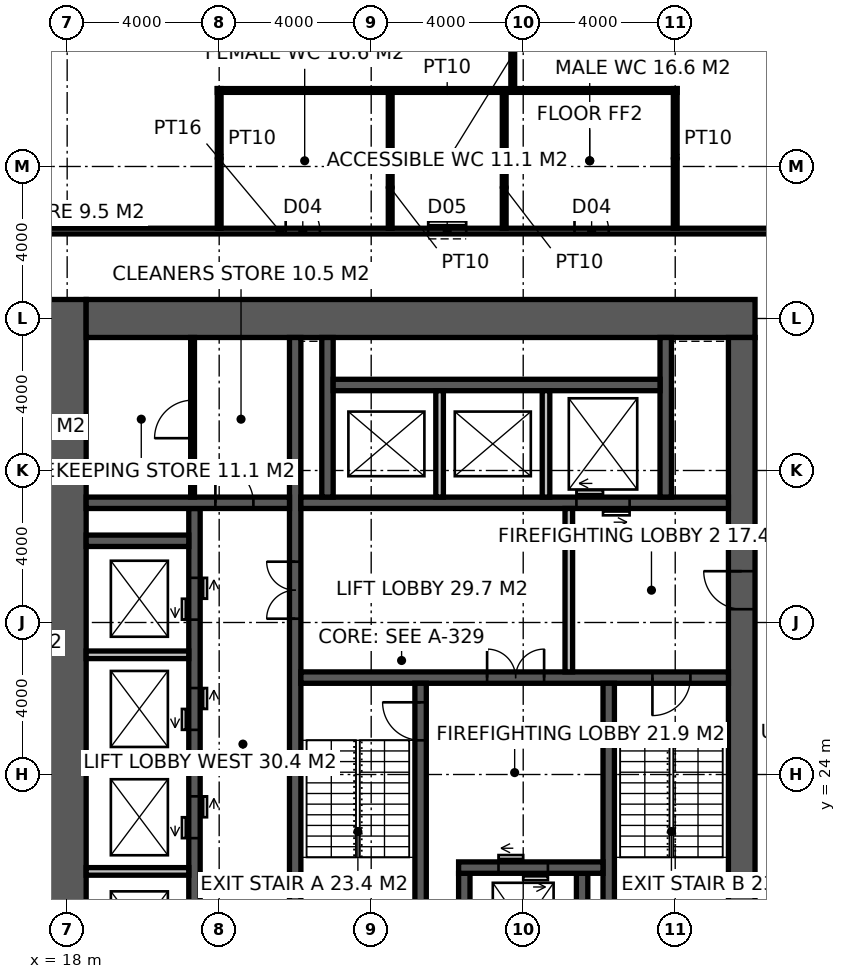
"""IFC4 building model, lengths in metres.
Left out: names, types, materials, properties, quantities, classifications, styles, units other than length and angle.
Written with IfcOpenShell. Run it as: python <this file> out.ifc"""

import sys

from ifc_helpers import new_model, si_unit, direction, frame, frame_2d, origin, place, context, subcontext, project, spatial, rectangle, extrude, element, fill, save


model = new_model("IFC4")
c1 = context("Model", 3, precision=1e-05, world=origin(), true_north=direction((0.0, 1.0)))
c2 = subcontext(c1, "Body", "Model", "MODEL_VIEW")
j1 = project(units=[si_unit("LENGTHUNIT", "METRE"), si_unit("PLANEANGLEUNIT", "RADIAN")], contexts=[c1])
p1 = place(None, origin())
s1 = spatial("IfcSite", under=j1, at=p1, CompositionType="ELEMENT")
p2 = place(p1, origin())
s2 = spatial("IfcBuilding", under=s1, at=p2, CompositionType="ELEMENT")
p3 = place(p2, frame((0.0, 0.0, 167.8)))
s3 = spatial("IfcBuildingStorey", under=s2, at=p3, CompositionType="ELEMENT", Elevation=167.8)
p4 = place(p3, frame((18.0, 17.5, -0.15), z_axis=(0.0, 0.0, 1.0), x_axis=(0.0, 1.0, 0.0)))
e1 = element("IfcWall", 1, at=p4, inside=s3, PredefinedType="SHEAR", context=c2, shape_type="SweptSolid", body=[
    extrude(rectangle(XDim=19.0, YDim=1.0, at=frame_2d((9.5, 0.0))), origin(), (0.0, 0.0, 1.0), 4.0),
])
p5 = place(p3, frame((18.5, 36.0, -0.15), z_axis=(0.0, 0.0, 1.0), x_axis=(1.0, 0.0, 0.0)))
e2 = element("IfcWall", 2, at=p5, inside=s3, PredefinedType="SHEAR", context=c2, shape_type="SweptSolid", body=[
    extrude(rectangle(XDim=17.6, YDim=1.0, at=frame_2d((8.8, 0.0))), origin(), (0.0, 0.0, 1.0), 4.0),
])
p6 = place(p3, frame((35.75, 18.5, -0.15), z_axis=(0.0, 0.0, 1.0), x_axis=(0.0, 1.0, 0.0)))
e3 = element("IfcWall", 3, at=p6, inside=s3, PredefinedType="SHEAR", context=c2, shape_type="SweptSolid", body=[
    extrude(rectangle(XDim=17.0, YDim=0.7, at=frame_2d((8.5, 0.0))), origin(), (0.0, 0.0, 1.0), 4.0),
])
p7 = place(p6, frame((9.85, 0.0, 0.15)))
e4 = element("IfcOpeningElement", 4, at=p7, cuts=e3, PredefinedType="OPENING", context=c2, shape_type="SweptSolid", body=[
    extrude(rectangle(XDim=1.0, YDim=2.2, at=frame_2d((0.5, 1.1))), frame((0.0, 0.36, 0.0), z_axis=(0.0, -1.0, 0.0), x_axis=(1.0, 0.0, 0.0)), (0.0, 0.0, 1.0), 0.72),
])
p8 = place(p3, frame((24.0, 18.5, -0.15), z_axis=(0.0, 0.0, 1.0), x_axis=(0.0, 1.0, 0.0)))
e5 = element("IfcWall", 5, at=p8, inside=s3, PredefinedType="SHEAR", context=c2, shape_type="SweptSolid", body=[
    extrude(rectangle(XDim=17.0, YDim=0.3, at=frame_2d((8.5, 0.0))), origin(), (0.0, 0.0, 1.0), 4.0),
])
p9 = place(p8, frame((9.6, 0.0, 0.15)))
e6 = element("IfcOpeningElement", 6, at=p9, cuts=e5, PredefinedType="OPENING", context=c2, shape_type="SweptSolid", body=[
    extrude(rectangle(XDim=1.5, YDim=2.4, at=frame_2d((0.75, 1.2))), frame((0.0, 0.16, 0.0), z_axis=(0.0, -1.0, 0.0), x_axis=(1.0, 0.0, 0.0)), (0.0, 0.0, 1.0), 0.32),
])
p10 = place(p3, frame((24.15, 26.55, -0.15), z_axis=(0.0, 0.0, 1.0), x_axis=(1.0, 0.0, 0.0)))
e7 = element("IfcWall", 7, at=p10, inside=s3, PredefinedType="SHEAR", context=c2, shape_type="SweptSolid", body=[
    extrude(rectangle(XDim=11.25, YDim=0.3, at=frame_2d((5.625, 0.0))), origin(), (0.0, 0.0, 1.0), 4.0),
])
p11 = place(p10, frame((9.25, 0.0, 0.15)))
e8 = element("IfcOpeningElement", 8, at=p11, cuts=e7, PredefinedType="OPENING", context=c2, shape_type="SweptSolid", body=[
    extrude(rectangle(XDim=1.0, YDim=2.2, at=frame_2d((0.5, 1.1))), frame((0.0, 0.16, 0.0), z_axis=(0.0, -1.0, 0.0), x_axis=(1.0, 0.0, 0.0)), (0.0, 0.0, 1.0), 0.32),
])
p12 = place(p10, frame((4.9, 0.0, 0.15)))
e9 = element("IfcOpeningElement", 9, at=p12, cuts=e7, PredefinedType="OPENING", context=c2, shape_type="SweptSolid", body=[
    extrude(rectangle(XDim=1.5, YDim=2.4, at=frame_2d((0.75, 1.2))), frame((0.0, 0.16, 0.0), z_axis=(0.0, -1.0, 0.0), x_axis=(1.0, 0.0, 0.0)), (0.0, 0.0, 1.0), 0.32),
])
p13 = place(p3, frame((27.3, 18.5, -0.15), z_axis=(0.0, 0.0, 1.0), x_axis=(0.0, 1.0, 0.0)))
e10 = element("IfcWall", 10, at=p13, inside=s3, PredefinedType="SHEAR", context=c2, shape_type="SweptSolid", body=[
    extrude(rectangle(XDim=7.9, YDim=0.3, at=frame_2d((3.95, 0.0))), origin(), (0.0, 0.0, 1.0), 4.0),
])
p14 = place(p13, frame((6.4, 0.0, 0.15)))
e11 = element("IfcOpeningElement", 11, at=p14, cuts=e10, PredefinedType="OPENING", context=c2, shape_type="SweptSolid", body=[
    extrude(rectangle(XDim=1.0, YDim=2.2, at=frame_2d((0.5, 1.1))), frame((0.0, 0.16, 0.0), z_axis=(0.0, -1.0, 0.0), x_axis=(1.0, 0.0, 0.0)), (0.0, 0.0, 1.0), 0.32),
])
p15 = place(p3, frame((32.25, 18.5, -0.15), z_axis=(0.0, 0.0, 1.0), x_axis=(0.0, 1.0, 0.0)))
e12 = element("IfcWall", 12, at=p15, inside=s3, PredefinedType="SHEAR", context=c2, shape_type="SweptSolid", body=[
    extrude(rectangle(XDim=7.9, YDim=0.3, at=frame_2d((3.95, 0.0))), origin(), (0.0, 0.0, 1.0), 4.0),
])
for number, where, z_axis, x_axis in (
    (13, (28.45, 18.5, -0.15), (0.0, 0.0, 1.0), (0.0, 1.0, 0.0)),
    (14, (31.55, 18.5, -0.15), (0.0, 0.0, 1.0), (0.0, 1.0, 0.0)),
):
    element("IfcWall", number, at=place(p3, frame(where, z_axis=z_axis, x_axis=x_axis)), inside=s3, PredefinedType="SHEAR", context=c2, shape_type="SweptSolid", body=[
        extrude(rectangle(XDim=2.9, YDim=0.3, at=frame_2d((1.45, 0.0))), origin(), (0.0, 0.0, 1.0), 4.0),
    ])
p16 = place(p3, frame((28.3, 21.55, -0.15), z_axis=(0.0, 0.0, 1.0), x_axis=(1.0, 0.0, 0.0)))
e15 = element("IfcWall", 15, at=p16, inside=s3, PredefinedType="SHEAR", context=c2, shape_type="SweptSolid", body=[
    extrude(rectangle(XDim=3.8, YDim=0.3, at=frame_2d((1.9, 0.0))), origin(), (0.0, 0.0, 1.0), 4.0),
])
p17 = place(p16, frame((1.05, 0.0, 0.15)))
e16 = element("IfcOpeningElement", 16, at=p17, cuts=e15, PredefinedType="OPENING", context=c2, shape_type="SweptSolid", body=[
    extrude(rectangle(XDim=1.3, YDim=2.4, at=frame_2d((0.65, 1.2))), frame((0.0, 0.16, 0.0), z_axis=(0.0, -1.0, 0.0), x_axis=(1.0, 0.0, 0.0)), (0.0, 0.0, 1.0), 0.32),
])
p18 = place(p3, frame((24.15, 31.15, -0.15), z_axis=(0.0, 0.0, 1.0), x_axis=(1.0, 0.0, 0.0)))
e17 = element("IfcWall", 17, at=p18, inside=s3, PredefinedType="SHEAR", context=c2, shape_type="SweptSolid", body=[
    extrude(rectangle(XDim=11.25, YDim=0.3, at=frame_2d((5.625, 0.0))), origin(), (0.0, 0.0, 1.0), 4.0),
])
p19 = place(p18, frame((7.25, 0.0, 0.15)))
e18 = element("IfcOpeningElement", 18, at=p19, cuts=e17, PredefinedType="OPENING", context=c2, shape_type="SweptSolid", body=[
    extrude(rectangle(XDim=1.4, YDim=2.4, at=frame_2d((0.7, 1.2))), frame((0.0, 0.16, 0.0), z_axis=(0.0, -1.0, 0.0), x_axis=(1.0, 0.0, 0.0)), (0.0, 0.0, 1.0), 0.32),
])
p20 = place(p3, frame((21.35, 18.5, -0.15), z_axis=(0.0, 0.0, 1.0), x_axis=(0.0, 1.0, 0.0)))
e19 = element("IfcWall", 19, at=p20, inside=s3, PredefinedType="SHEAR", context=c2, shape_type="SweptSolid", body=[
    extrude(rectangle(XDim=12.5, YDim=0.3, at=frame_2d((6.25, 0.0))), origin(), (0.0, 0.0, 1.0), 4.0),
])
p21 = place(p20, frame((0.875, 0.0, 0.15)))
e20 = element("IfcOpeningElement", 20, at=p21, cuts=e19, PredefinedType="OPENING", context=c2, shape_type="SweptSolid", body=[
    extrude(rectangle(XDim=1.1, YDim=2.2, at=frame_2d((0.55, 1.1))), frame((0.0, 0.16, 0.0), z_axis=(0.0, -1.0, 0.0), x_axis=(1.0, 0.0, 0.0)), (0.0, 0.0, 1.0), 0.32),
])
p22 = place(p20, frame((3.825, 0.0, 0.15)))
e21 = element("IfcOpeningElement", 21, at=p22, cuts=e19, PredefinedType="OPENING", context=c2, shape_type="SweptSolid", body=[
    extrude(rectangle(XDim=1.1, YDim=2.2, at=frame_2d((0.55, 1.1))), frame((0.0, 0.16, 0.0), z_axis=(0.0, -1.0, 0.0), x_axis=(1.0, 0.0, 0.0)), (0.0, 0.0, 1.0), 0.32),
])
p23 = place(p20, frame((6.675, 0.0, 0.15)))
e22 = element("IfcOpeningElement", 22, at=p23, cuts=e19, PredefinedType="OPENING", context=c2, shape_type="SweptSolid", body=[
    extrude(rectangle(XDim=1.1, YDim=2.2, at=frame_2d((0.55, 1.1))), frame((0.0, 0.16, 0.0), z_axis=(0.0, -1.0, 0.0), x_axis=(1.0, 0.0, 0.0)), (0.0, 0.0, 1.0), 0.32),
])
p24 = place(p20, frame((9.575, 0.0, 0.15)))
e23 = element("IfcOpeningElement", 23, at=p24, cuts=e19, PredefinedType="OPENING", context=c2, shape_type="SweptSolid", body=[
    extrude(rectangle(XDim=1.1, YDim=2.2, at=frame_2d((0.55, 1.1))), frame((0.0, 0.16, 0.0), z_axis=(0.0, -1.0, 0.0), x_axis=(1.0, 0.0, 0.0)), (0.0, 0.0, 1.0), 0.32),
])
p25 = place(p3, frame((18.5, 31.15, -0.15), z_axis=(0.0, 0.0, 1.0), x_axis=(1.0, 0.0, 0.0)))
e24 = element("IfcWall", 24, at=p25, inside=s3, PredefinedType="SHEAR", context=c2, shape_type="SweptSolid", body=[
    extrude(rectangle(XDim=5.35, YDim=0.3, at=frame_2d((2.675, 0.0))), origin(), (0.0, 0.0, 1.0), 4.0),
])
p26 = place(p25, frame((3.4, 0.0, 0.15)))
e25 = element("IfcOpeningElement", 25, at=p26, cuts=e24, PredefinedType="OPENING", context=c2, shape_type="SweptSolid", body=[
    extrude(rectangle(XDim=1.0, YDim=2.2, at=frame_2d((0.5, 1.1))), frame((0.0, 0.16, 0.0), z_axis=(0.0, -1.0, 0.0), x_axis=(1.0, 0.0, 0.0)), (0.0, 0.0, 1.0), 0.32),
])
p27 = place(p3, frame((18.5, 30.15, -0.15), z_axis=(0.0, 0.0, 1.0), x_axis=(1.0, 0.0, 0.0)))
e26 = element("IfcWall", 26, at=p27, inside=s3, PredefinedType="SHEAR", context=c2, shape_type="SweptSolid", body=[
    extrude(rectangle(XDim=2.7, YDim=0.3, at=frame_2d((1.35, 0.0))), origin(), (0.0, 0.0, 1.0), 4.0),
])
for number, where, z_axis, x_axis in (
    (27, (24.85, 31.3, -0.15), (0.0, 0.0, 1.0), (0.0, 1.0, 0.0)),
    (28, (33.75, 31.3, -0.15), (0.0, 0.0, 1.0), (0.0, 1.0, 0.0)),
):
    element("IfcWall", number, at=place(p3, frame(where, z_axis=z_axis, x_axis=x_axis)), inside=s3, PredefinedType="SHEAR", context=c2, shape_type="SweptSolid", body=[
        extrude(rectangle(XDim=4.2, YDim=0.3, at=frame_2d((2.1, 0.0))), origin(), (0.0, 0.0, 1.0), 4.0),
    ])
p28 = place(p3, frame((25.0, 34.25, -0.15), z_axis=(0.0, 0.0, 1.0), x_axis=(1.0, 0.0, 0.0)))
e29 = element("IfcWall", 29, at=p28, inside=s3, PredefinedType="SHEAR", context=c2, shape_type="SweptSolid", body=[
    extrude(rectangle(XDim=8.6, YDim=0.3, at=frame_2d((4.3, 0.0))), origin(), (0.0, 0.0, 1.0), 4.0),
])
for number, where, z_axis, x_axis in (
    (30, (27.8, 31.3, -0.15), (0.0, 0.0, 1.0), (0.0, 1.0, 0.0)),
    (31, (30.6, 31.3, -0.15), (0.0, 0.0, 1.0), (0.0, 1.0, 0.0)),
):
    element("IfcWall", number, at=place(p3, frame(where, z_axis=z_axis, x_axis=x_axis)), inside=s3, PredefinedType="SOLIDWALL", context=c2, shape_type="SweptSolid", body=[
        extrude(rectangle(XDim=2.8, YDim=0.2, at=frame_2d((1.4, 0.0))), origin(), (0.0, 0.0, 1.0), 4.0),
    ])
for number, where, z_axis, x_axis in (
    (32, (18.5, 21.45, -0.15), (0.0, 0.0, 1.0), (1.0, 0.0, 0.0)),
    (33, (18.5, 24.3, -0.15), (0.0, 0.0, 1.0), (1.0, 0.0, 0.0)),
    (34, (18.5, 27.15, -0.15), (0.0, 0.0, 1.0), (1.0, 0.0, 0.0)),
):
    element("IfcWall", number, at=place(p3, frame(where, z_axis=z_axis, x_axis=x_axis)), inside=s3, PredefinedType="SOLIDWALL", context=c2, shape_type="SweptSolid", body=[
        extrude(rectangle(XDim=2.7, YDim=0.2, at=frame_2d((1.35, 0.0))), origin(), (0.0, 0.0, 1.0), 4.0),
    ])
p29 = place(p3, frame((31.2, 26.7, 0.0), z_axis=(0.0, 0.0, 1.0), x_axis=(0.0, 1.0, 0.0)))
e35 = element("IfcWall", 35, at=p29, inside=s3, PredefinedType="SOLIDWALL", context=c2, shape_type="SweptSolid", body=[
    extrude(rectangle(XDim=4.3, YDim=0.2, at=frame_2d((2.15, 0.0))), origin(), (0.0, 0.0, 1.0), 3.85),
])
p30 = place(p3, frame((21.3, 31.3, 0.0), z_axis=(0.0, 0.0, 1.0), x_axis=(0.0, 1.0, 0.0)))
e36 = element("IfcWall", 36, at=p30, inside=s3, PredefinedType="PARTITIONING", context=c2, shape_type="SweptSolid", body=[
    extrude(rectangle(XDim=4.2, YDim=0.1, at=frame_2d((2.1, 0.0))), origin(), (0.0, 0.0, 1.0), 3.85),
])
p31 = place(p30, frame((1.55, 0.0, 0.0)))
e37 = element("IfcOpeningElement", 37, at=p31, cuts=e36, PredefinedType="OPENING", context=c2, shape_type="SweptSolid", body=[
    extrude(rectangle(XDim=1.0, YDim=2.2, at=frame_2d((0.5, 1.1))), frame((0.0, 0.06, 0.0), z_axis=(0.0, -1.0, 0.0), x_axis=(1.0, 0.0, 0.0)), (0.0, 0.0, 1.0), 0.12),
])
p32 = place(p3, frame((17.5, 38.3, 0.0), z_axis=(0.0, 0.0, 1.0), x_axis=(1.0, 0.0, 0.0)))
e38 = element("IfcWall", 38, at=p32, inside=s3, PredefinedType="PARTITIONING", context=c2, shape_type="SweptSolid", body=[
    extrude(rectangle(XDim=20.325, YDim=0.15, at=frame_2d((10.163, 0.0))), origin(), (0.0, 0.0, 1.0), 3.85),
])
p33 = place(p32, frame((6.25, 0.0, 0.0)))
e39 = element("IfcOpeningElement", 39, at=p33, cuts=e38, PredefinedType="OPENING", context=c2, shape_type="SweptSolid", body=[
    extrude(rectangle(XDim=0.9, YDim=2.1, at=frame_2d((0.45, 1.05))), frame((0.0, 0.085, 0.0), z_axis=(0.0, -1.0, 0.0), x_axis=(1.0, 0.0, 0.0)), (0.0, 0.0, 1.0), 0.17),
])
p34 = place(p32, frame((10.0, 0.0, 0.0)))
e40 = element("IfcOpeningElement", 40, at=p34, cuts=e38, PredefinedType="OPENING", context=c2, shape_type="SweptSolid", body=[
    extrude(rectangle(XDim=1.0, YDim=2.1, at=frame_2d((0.5, 1.05))), frame((0.0, 0.085, 0.0), z_axis=(0.0, -1.0, 0.0), x_axis=(1.0, 0.0, 0.0)), (0.0, 0.0, 1.0), 0.17),
])
p35 = place(p32, frame((13.85, 0.0, 0.0)))
e41 = element("IfcOpeningElement", 41, at=p35, cuts=e38, PredefinedType="OPENING", context=c2, shape_type="SweptSolid", body=[
    extrude(rectangle(XDim=0.9, YDim=2.1, at=frame_2d((0.45, 1.05))), frame((0.0, 0.085, 0.0), z_axis=(0.0, -1.0, 0.0), x_axis=(1.0, 0.0, 0.0)), (0.0, 0.0, 1.0), 0.17),
])
for number, where, z_axis, x_axis in (
    (42, (22.0, 38.375, 0.0), (0.0, 0.0, 1.0), (0.0, 1.0, 0.0)),
    (43, (34.0, 38.375, 0.0), (0.0, 0.0, 1.0), (0.0, 1.0, 0.0)),
):
    element("IfcWall", number, at=place(p3, frame(where, z_axis=z_axis, x_axis=x_axis)), inside=s3, PredefinedType="PARTITIONING", context=c2, shape_type="SweptSolid", body=[
        extrude(rectangle(XDim=3.675, YDim=0.1, at=frame_2d((1.837, 0.0))), origin(), (0.0, 0.0, 1.0), 2.65),
    ])
p36 = place(p3, frame((21.95, 42.0, 0.0), z_axis=(0.0, 0.0, 1.0), x_axis=(1.0, 0.0, 0.0)))
e44 = element("IfcWall", 44, at=p36, inside=s3, PredefinedType="PARTITIONING", context=c2, shape_type="SweptSolid", body=[
    extrude(rectangle(XDim=12.1, YDim=0.1, at=frame_2d((6.05, 0.0))), origin(), (0.0, 0.0, 1.0), 3.85),
])
for number, where, z_axis, x_axis in (
    (45, (26.5, 38.375, 0.0), (0.0, 0.0, 1.0), (0.0, 1.0, 0.0)),
    (46, (29.5, 38.375, 0.0), (0.0, 0.0, 1.0), (0.0, 1.0, 0.0)),
):
    element("IfcWall", number, at=place(p3, frame(where, z_axis=z_axis, x_axis=x_axis)), inside=s3, PredefinedType="PARTITIONING", context=c2, shape_type="SweptSolid", body=[
        extrude(rectangle(XDim=3.575, YDim=0.1, at=frame_2d((1.788, 0.0))), origin(), (0.0, 0.0, 1.0), 2.65),
    ])
p37 = place(p3, frame((29.725, 51.7, 0.0), z_axis=(0.0, 0.0, 1.0), x_axis=(0.0, -1.0, 0.0)))
e47 = element("IfcWall", 47, at=p37, inside=s3, PredefinedType="PARTITIONING", context=c2, shape_type="SweptSolid", body=[
    extrude(rectangle(XDim=9.7, YDim=0.1, at=frame_2d((4.85, 0.0))), origin(), (0.0, 0.0, 1.0), 2.65),
])
p38 = place(p37, frame((4.35, 0.0, 0.0)))
e48 = element("IfcOpeningElement", 48, at=p38, cuts=e47, PredefinedType="OPENING", context=c2, shape_type="SweptSolid", body=[
    extrude(rectangle(XDim=1.0, YDim=2.2, at=frame_2d((0.5, 1.1))), frame((0.0, 0.06, 0.0), z_axis=(0.0, -1.0, 0.0), x_axis=(1.0, 0.0, 0.0)), (0.0, 0.0, 1.0), 0.12),
])
p39 = place(p14, origin())
e49 = element("IfcDoor", 49, at=p39, inside=s3, OperationType="SINGLE_SWING_RIGHT", PredefinedType="DOOR", context=c2, shape_type="SweptSolid", body=[
    extrude(rectangle(XDim=1.0, YDim=2.2, at=frame_2d((0.5, 1.1))), frame((0.0, 0.025, 0.0), z_axis=(0.0, -1.0, 0.0), x_axis=(1.0, 0.0, 0.0)), (0.0, 0.0, 1.0), 0.05),
])
fill(e11, e49)
p40 = place(p11, frame((1.0, 0.0, 0.0), z_axis=(0.0, 0.0, 1.0), x_axis=(-1.0, 0.0, 0.0)))
e50 = element("IfcDoor", 50, at=p40, inside=s3, OperationType="SINGLE_SWING_RIGHT", PredefinedType="DOOR", context=c2, shape_type="SweptSolid", body=[
    extrude(rectangle(XDim=1.0, YDim=2.2, at=frame_2d((0.5, 1.1))), frame((0.0, 0.025, 0.0), z_axis=(0.0, -1.0, 0.0), x_axis=(1.0, 0.0, 0.0)), (0.0, 0.0, 1.0), 0.05),
])
fill(e8, e50)
p41 = place(p7, origin())
e51 = element("IfcDoor", 51, at=p41, inside=s3, OperationType="SINGLE_SWING_RIGHT", PredefinedType="DOOR", context=c2, shape_type="SweptSolid", body=[
    extrude(rectangle(XDim=1.0, YDim=2.2, at=frame_2d((0.5, 1.1))), frame((0.0, 0.025, 0.0), z_axis=(0.0, -1.0, 0.0), x_axis=(1.0, 0.0, 0.0)), (0.0, 0.0, 1.0), 0.05),
])
fill(e4, e51)
p42 = place(p12, origin())
e52 = element("IfcDoor", 52, at=p42, inside=s3, OperationType="DOUBLE_DOOR_DOUBLE_SWING", PredefinedType="DOOR", context=c2, shape_type="SweptSolid", body=[
    extrude(rectangle(XDim=1.5, YDim=2.4, at=frame_2d((0.75, 1.2))), frame((0.0, 0.025, 0.0), z_axis=(0.0, -1.0, 0.0), x_axis=(1.0, 0.0, 0.0)), (0.0, 0.0, 1.0), 0.05),
])
fill(e9, e52)
p43 = place(p9, origin())
e53 = element("IfcDoor", 53, at=p43, inside=s3, OperationType="DOUBLE_DOOR_DOUBLE_SWING", PredefinedType="DOOR", context=c2, shape_type="SweptSolid", body=[
    extrude(rectangle(XDim=1.5, YDim=2.4, at=frame_2d((0.75, 1.2))), frame((0.0, 0.025, 0.0), z_axis=(0.0, -1.0, 0.0), x_axis=(1.0, 0.0, 0.0)), (0.0, 0.0, 1.0), 0.05),
])
fill(e6, e53)
p44 = place(p26, origin())
e54 = element("IfcDoor", 54, at=p44, inside=s3, OperationType="SINGLE_SWING_LEFT", PredefinedType="DOOR", context=c2, shape_type="SweptSolid", body=[
    extrude(rectangle(XDim=1.0, YDim=2.2, at=frame_2d((0.5, 1.1))), frame((0.0, 0.025, 0.0), z_axis=(0.0, -1.0, 0.0), x_axis=(1.0, 0.0, 0.0)), (0.0, 0.0, 1.0), 0.05),
])
fill(e25, e54)
p45 = place(p31, origin())
e55 = element("IfcDoor", 55, at=p45, inside=s3, OperationType="SINGLE_SWING_LEFT", PredefinedType="DOOR", context=c2, shape_type="SweptSolid", body=[
    extrude(rectangle(XDim=1.0, YDim=2.2, at=frame_2d((0.5, 1.1))), frame((0.0, 0.025, 0.0), z_axis=(0.0, -1.0, 0.0), x_axis=(1.0, 0.0, 0.0)), (0.0, 0.0, 1.0), 0.05),
])
fill(e37, e55)
p46 = place(p33, origin())
e56 = element("IfcDoor", 56, at=p46, inside=s3, OperationType="SINGLE_SWING_LEFT", PredefinedType="DOOR", context=c2, shape_type="SweptSolid", body=[
    extrude(rectangle(XDim=0.9, YDim=2.1, at=frame_2d((0.45, 1.05))), frame((0.0, 0.025, 0.0), z_axis=(0.0, -1.0, 0.0), x_axis=(1.0, 0.0, 0.0)), (0.0, 0.0, 1.0), 0.05),
])
fill(e39, e56)
p47 = place(p34, origin())
e57 = element("IfcDoor", 57, at=p47, inside=s3, OperationType="SLIDING_TO_LEFT", PredefinedType="DOOR", context=c2, shape_type="SweptSolid", body=[
    extrude(rectangle(XDim=1.0, YDim=2.1, at=frame_2d((0.5, 1.05))), frame((0.0, 0.025, 0.0), z_axis=(0.0, -1.0, 0.0), x_axis=(1.0, 0.0, 0.0)), (0.0, 0.0, 1.0), 0.05),
])
fill(e40, e57)
p48 = place(p35, origin())
e58 = element("IfcDoor", 58, at=p48, inside=s3, OperationType="SINGLE_SWING_LEFT", PredefinedType="DOOR", context=c2, shape_type="SweptSolid", body=[
    extrude(rectangle(XDim=0.9, YDim=2.1, at=frame_2d((0.45, 1.05))), frame((0.0, 0.025, 0.0), z_axis=(0.0, -1.0, 0.0), x_axis=(1.0, 0.0, 0.0)), (0.0, 0.0, 1.0), 0.05),
])
fill(e41, e58)
p49 = place(p17, origin())
e59 = element("IfcDoor", 59, at=p49, inside=s3, OperationType="DOUBLE_DOOR_SLIDING", PredefinedType="DOOR", context=c2, shape_type="SweptSolid", body=[
    extrude(rectangle(XDim=1.3, YDim=2.4, at=frame_2d((0.65, 1.2))), frame((0.0, 0.025, 0.0), z_axis=(0.0, -1.0, 0.0), x_axis=(1.0, 0.0, 0.0)), (0.0, 0.0, 1.0), 0.05),
])
fill(e16, e59)
p50 = place(p19, origin())
e60 = element("IfcDoor", 60, at=p50, inside=s3, OperationType="DOUBLE_DOOR_SLIDING", PredefinedType="DOOR", context=c2, shape_type="SweptSolid", body=[
    extrude(rectangle(XDim=1.4, YDim=2.4, at=frame_2d((0.7, 1.2))), frame((0.0, 0.025, 0.0), z_axis=(0.0, -1.0, 0.0), x_axis=(1.0, 0.0, 0.0)), (0.0, 0.0, 1.0), 0.05),
])
fill(e18, e60)
p51 = place(p22, origin())
e61 = element("IfcDoor", 61, at=p51, inside=s3, OperationType="DOUBLE_DOOR_SLIDING", PredefinedType="DOOR", context=c2, shape_type="SweptSolid", body=[
    extrude(rectangle(XDim=1.1, YDim=2.2, at=frame_2d((0.55, 1.1))), frame((0.0, 0.025, 0.0), z_axis=(0.0, -1.0, 0.0), x_axis=(1.0, 0.0, 0.0)), (0.0, 0.0, 1.0), 0.05),
])
fill(e21, e61)
p52 = place(p23, origin())
e62 = element("IfcDoor", 62, at=p52, inside=s3, OperationType="DOUBLE_DOOR_SLIDING", PredefinedType="DOOR", context=c2, shape_type="SweptSolid", body=[
    extrude(rectangle(XDim=1.1, YDim=2.2, at=frame_2d((0.55, 1.1))), frame((0.0, 0.025, 0.0), z_axis=(0.0, -1.0, 0.0), x_axis=(1.0, 0.0, 0.0)), (0.0, 0.0, 1.0), 0.05),
])
fill(e22, e62)
p53 = place(p24, origin())
e63 = element("IfcDoor", 63, at=p53, inside=s3, OperationType="DOUBLE_DOOR_SLIDING", PredefinedType="DOOR", context=c2, shape_type="SweptSolid", body=[
    extrude(rectangle(XDim=1.1, YDim=2.2, at=frame_2d((0.55, 1.1))), frame((0.0, 0.025, 0.0), z_axis=(0.0, -1.0, 0.0), x_axis=(1.0, 0.0, 0.0)), (0.0, 0.0, 1.0), 0.05),
])
fill(e23, e63)
save(model, sys.argv[1])
